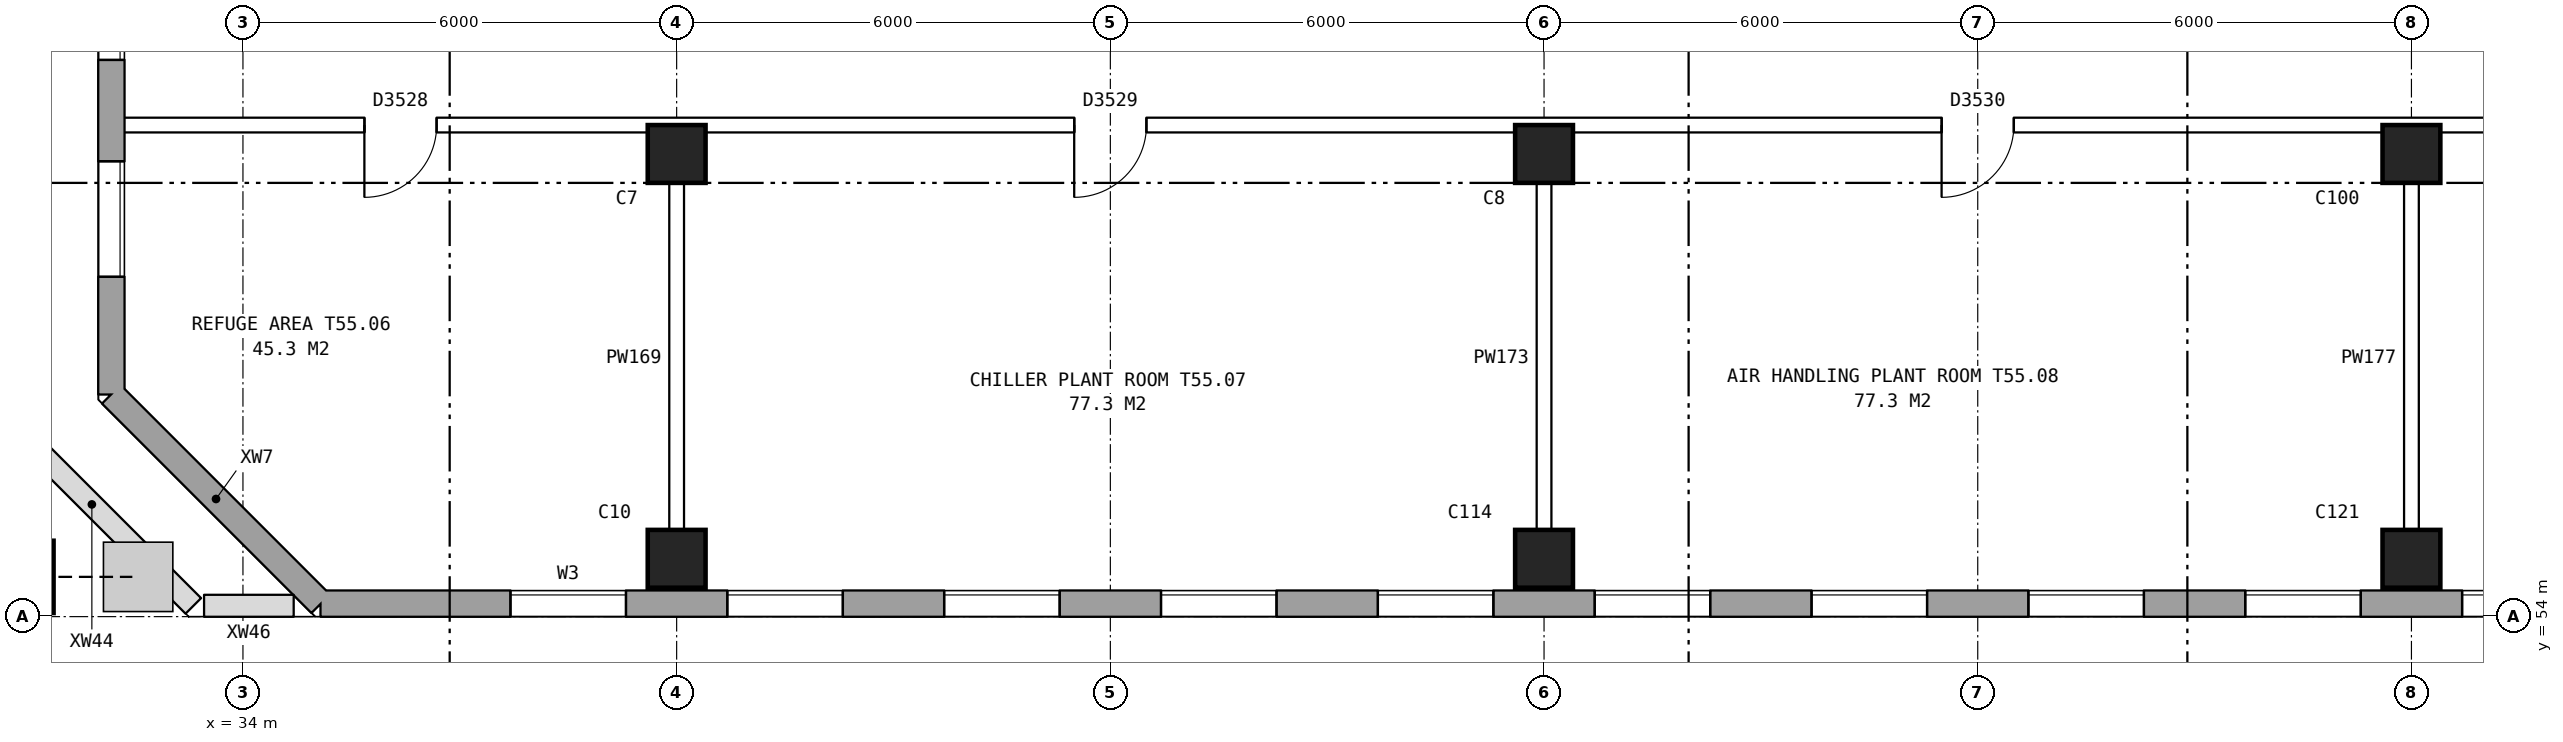
"""IFC4 building model, lengths in metres.
Left out: names, types, materials, properties, quantities, classifications, styles, units other than length and angle.
Written with IfcOpenShell. Run it as: python <this file> out.ifc"""

import sys

from ifc_helpers import new_model, si_unit, direction, frame, frame_2d, origin, origin_2d, place, context, subcontext, project, spatial, rectangle, hollow_rectangle, extrude, element, fill, save


model = new_model("IFC4")
c1 = context("Model", 3, precision=1e-05, world=origin(), true_north=direction((0.0, 1.0)))
c2 = subcontext(c1, "Body", "Model", "MODEL_VIEW")
j1 = project(units=[si_unit("LENGTHUNIT", "METRE"), si_unit("PLANEANGLEUNIT", "RADIAN")], contexts=[c1])
p1 = place(None, origin())
s1 = spatial("IfcSite", under=j1, at=p1, CompositionType="ELEMENT")
p2 = place(p1, origin())
s2 = spatial("IfcBuilding", under=s1, at=p2, CompositionType="ELEMENT")
p3 = place(p2, frame((0.0, 0.0, 194.4)))
s3 = spatial("IfcBuildingStorey", under=s2, at=p3, CompositionType="ELEMENT", Elevation=194.4)
for number, where, z_axis, x_axis in (
    (1, (40.0, 54.8, 0.0), (0.0, 0.0, 1.0), (1.0, 0.0, 0.0)),
    (2, (40.0, 60.4, 0.0), (0.0, 0.0, 1.0), (1.0, 0.0, 0.0)),
    (3, (52.0, 54.8, 0.0), (0.0, 0.0, 1.0), (1.0, 0.0, 0.0)),
    (4, (52.0, 60.4, 0.0), (0.0, 0.0, 1.0), (1.0, 0.0, 0.0)),
    (5, (64.0, 54.8, 0.0), (0.0, 0.0, 1.0), (1.0, 0.0, 0.0)),
    (6, (64.0, 60.4, 0.0), (0.0, 0.0, 1.0), (1.0, 0.0, 0.0)),
):
    element("IfcColumn", number, at=place(p3, frame(where, z_axis=z_axis, x_axis=x_axis)), inside=s3, PredefinedType="COLUMN", context=c2, shape_type="SweptSolid", body=[
        extrude(rectangle(XDim=0.8, YDim=0.8, at=origin_2d()), origin(), (0.0, 0.0, 1.0), 3.95),
    ])
p4 = place(p3, frame((30.88, 54.55, 0.192), z_axis=(0.384632160448, 0.0, 0.923069932968), x_axis=(0.0, 1.0, 0.0)))
e7 = element("IfcColumn", 7, at=p4, inside=s3, PredefinedType="COLUMN", context=c2, shape_type="SweptSolid", body=[
    extrude(hollow_rectangle(XDim=1.0, YDim=1.0, WallThickness=0.055, at=origin_2d()), origin(), (0.0, 0.0, 1.0), 4.133),
])
p5 = place(p3, frame((32.18, 57.075, 0.0), z_axis=(0.0, 0.0, 1.0), x_axis=(0.707106781187, -0.707106781187, 0.0)))
e8 = element("IfcWall", 8, at=p5, inside=s3, PredefinedType="STANDARD", context=c2, shape_type="SweptSolid", body=[
    extrude(rectangle(XDim=4.094, YDim=0.36, at=frame_2d((2.047, 0.0))), origin(), (0.0, 0.0, 1.0), 3.95),
])
p6 = place(p3, frame((35.075, 54.18, 0.0), z_axis=(0.0, 0.0, 1.0), x_axis=(1.0, 0.0, 0.0)))
e9 = element("IfcWall", 9, at=p6, inside=s3, PredefinedType="STANDARD", context=c2, shape_type="SweptSolid", body=[
    extrude(rectangle(XDim=39.875, YDim=0.36, at=frame_2d((19.938, 0.0))), origin(), (0.0, 0.0, 1.0), 3.95),
])
p7 = place(p6, frame((2.625, 0.0, 1.5)))
e10 = element("IfcOpeningElement", 10, at=p7, cuts=e9, PredefinedType="OPENING", context=c2, shape_type="SweptSolid", body=[
    extrude(rectangle(XDim=1.6, YDim=1.2, at=frame_2d((0.8, 0.6))), frame((0.0, 0.19, 0.0), z_axis=(0.0, -1.0, 0.0), x_axis=(1.0, 0.0, 0.0)), (0.0, 0.0, 1.0), 0.38),
])
p8 = place(p6, frame((5.625, 0.0, 1.5)))
e11 = element("IfcOpeningElement", 11, at=p8, cuts=e9, PredefinedType="OPENING", context=c2, shape_type="SweptSolid", body=[
    extrude(rectangle(XDim=1.6, YDim=1.2, at=frame_2d((0.8, 0.6))), frame((0.0, 0.19, 0.0), z_axis=(0.0, -1.0, 0.0), x_axis=(1.0, 0.0, 0.0)), (0.0, 0.0, 1.0), 0.38),
])
p9 = place(p6, frame((8.625, 0.0, 1.5)))
e12 = element("IfcOpeningElement", 12, at=p9, cuts=e9, PredefinedType="OPENING", context=c2, shape_type="SweptSolid", body=[
    extrude(rectangle(XDim=1.6, YDim=1.2, at=frame_2d((0.8, 0.6))), frame((0.0, 0.19, 0.0), z_axis=(0.0, -1.0, 0.0), x_axis=(1.0, 0.0, 0.0)), (0.0, 0.0, 1.0), 0.38),
])
p10 = place(p6, frame((11.625, 0.0, 1.5)))
e13 = element("IfcOpeningElement", 13, at=p10, cuts=e9, PredefinedType="OPENING", context=c2, shape_type="SweptSolid", body=[
    extrude(rectangle(XDim=1.6, YDim=1.2, at=frame_2d((0.8, 0.6))), frame((0.0, 0.19, 0.0), z_axis=(0.0, -1.0, 0.0), x_axis=(1.0, 0.0, 0.0)), (0.0, 0.0, 1.0), 0.38),
])
p11 = place(p6, frame((14.625, 0.0, 1.5)))
e14 = element("IfcOpeningElement", 14, at=p11, cuts=e9, PredefinedType="OPENING", context=c2, shape_type="SweptSolid", body=[
    extrude(rectangle(XDim=1.6, YDim=1.2, at=frame_2d((0.8, 0.6))), frame((0.0, 0.19, 0.0), z_axis=(0.0, -1.0, 0.0), x_axis=(1.0, 0.0, 0.0)), (0.0, 0.0, 1.0), 0.38),
])
p12 = place(p6, frame((17.625, 0.0, 1.5)))
e15 = element("IfcOpeningElement", 15, at=p12, cuts=e9, PredefinedType="OPENING", context=c2, shape_type="SweptSolid", body=[
    extrude(rectangle(XDim=1.6, YDim=1.2, at=frame_2d((0.8, 0.6))), frame((0.0, 0.19, 0.0), z_axis=(0.0, -1.0, 0.0), x_axis=(1.0, 0.0, 0.0)), (0.0, 0.0, 1.0), 0.38),
])
p13 = place(p6, frame((20.625, 0.0, 1.5)))
e16 = element("IfcOpeningElement", 16, at=p13, cuts=e9, PredefinedType="OPENING", context=c2, shape_type="SweptSolid", body=[
    extrude(rectangle(XDim=1.6, YDim=1.2, at=frame_2d((0.8, 0.6))), frame((0.0, 0.19, 0.0), z_axis=(0.0, -1.0, 0.0), x_axis=(1.0, 0.0, 0.0)), (0.0, 0.0, 1.0), 0.38),
])
p14 = place(p6, frame((23.625, 0.0, 1.5)))
e17 = element("IfcOpeningElement", 17, at=p14, cuts=e9, PredefinedType="OPENING", context=c2, shape_type="SweptSolid", body=[
    extrude(rectangle(XDim=1.6, YDim=1.2, at=frame_2d((0.8, 0.6))), frame((0.0, 0.19, 0.0), z_axis=(0.0, -1.0, 0.0), x_axis=(1.0, 0.0, 0.0)), (0.0, 0.0, 1.0), 0.38),
])
p15 = place(p6, frame((26.625, 0.0, 1.5)))
e18 = element("IfcOpeningElement", 18, at=p15, cuts=e9, PredefinedType="OPENING", context=c2, shape_type="SweptSolid", body=[
    extrude(rectangle(XDim=1.6, YDim=1.2, at=frame_2d((0.8, 0.6))), frame((0.0, 0.19, 0.0), z_axis=(0.0, -1.0, 0.0), x_axis=(1.0, 0.0, 0.0)), (0.0, 0.0, 1.0), 0.38),
])
p16 = place(p6, frame((29.625, 0.0, 1.5)))
e19 = element("IfcOpeningElement", 19, at=p16, cuts=e9, PredefinedType="OPENING", context=c2, shape_type="SweptSolid", body=[
    extrude(rectangle(XDim=1.6, YDim=1.2, at=frame_2d((0.8, 0.6))), frame((0.0, 0.19, 0.0), z_axis=(0.0, -1.0, 0.0), x_axis=(1.0, 0.0, 0.0)), (0.0, 0.0, 1.0), 0.38),
])
p17 = place(p6, frame((32.625, 0.0, 1.5)))
e20 = element("IfcOpeningElement", 20, at=p17, cuts=e9, PredefinedType="OPENING", context=c2, shape_type="SweptSolid", body=[
    extrude(rectangle(XDim=1.6, YDim=1.2, at=frame_2d((0.8, 0.6))), frame((0.0, 0.19, 0.0), z_axis=(0.0, -1.0, 0.0), x_axis=(1.0, 0.0, 0.0)), (0.0, 0.0, 1.0), 0.38),
])
p18 = place(p6, frame((35.625, 0.0, 1.5)))
e21 = element("IfcOpeningElement", 21, at=p18, cuts=e9, PredefinedType="OPENING", context=c2, shape_type="SweptSolid", body=[
    extrude(rectangle(XDim=1.6, YDim=1.2, at=frame_2d((0.8, 0.6))), frame((0.0, 0.19, 0.0), z_axis=(0.0, -1.0, 0.0), x_axis=(1.0, 0.0, 0.0)), (0.0, 0.0, 1.0), 0.38),
])
p19 = place(p3, frame((32.18, 82.925, 0.0), z_axis=(0.0, 0.0, 1.0), x_axis=(0.0, -1.0, 0.0)))
e22 = element("IfcWall", 22, at=p19, inside=s3, PredefinedType="STANDARD", context=c2, shape_type="SweptSolid", body=[
    extrude(rectangle(XDim=25.851, YDim=0.36, at=frame_2d((12.925, 0.0))), origin(), (0.0, 0.0, 1.0), 3.95),
])
p20 = place(p19, frame((1.625, 0.0, 1.5)))
e23 = element("IfcOpeningElement", 23, at=p20, cuts=e22, PredefinedType="OPENING", context=c2, shape_type="SweptSolid", body=[
    extrude(rectangle(XDim=1.6, YDim=1.2, at=frame_2d((0.8, 0.6))), frame((0.0, 0.19, 0.0), z_axis=(0.0, -1.0, 0.0), x_axis=(1.0, 0.0, 0.0)), (0.0, 0.0, 1.0), 0.38),
])
p21 = place(p19, frame((4.625, 0.0, 1.5)))
e24 = element("IfcOpeningElement", 24, at=p21, cuts=e22, PredefinedType="OPENING", context=c2, shape_type="SweptSolid", body=[
    extrude(rectangle(XDim=1.6, YDim=1.2, at=frame_2d((0.8, 0.6))), frame((0.0, 0.19, 0.0), z_axis=(0.0, -1.0, 0.0), x_axis=(1.0, 0.0, 0.0)), (0.0, 0.0, 1.0), 0.38),
])
p22 = place(p19, frame((19.625, 0.0, 1.5)))
e25 = element("IfcOpeningElement", 25, at=p22, cuts=e22, PredefinedType="OPENING", context=c2, shape_type="SweptSolid", body=[
    extrude(rectangle(XDim=1.6, YDim=1.2, at=frame_2d((0.8, 0.6))), frame((0.0, 0.19, 0.0), z_axis=(0.0, -1.0, 0.0), x_axis=(1.0, 0.0, 0.0)), (0.0, 0.0, 1.0), 0.38),
])
p23 = place(p19, frame((22.625, 0.0, 1.5)))
e26 = element("IfcOpeningElement", 26, at=p23, cuts=e22, PredefinedType="OPENING", context=c2, shape_type="SweptSolid", body=[
    extrude(rectangle(XDim=1.6, YDim=1.2, at=frame_2d((0.8, 0.6))), frame((0.0, 0.19, 0.0), z_axis=(0.0, -1.0, 0.0), x_axis=(1.0, 0.0, 0.0)), (0.0, 0.0, 1.0), 0.38),
])
p24 = place(p3, frame((30.508, 56.955, 0.0), z_axis=(0.0, 0.0, 1.0), x_axis=(0.70707600329, -0.707137557743, 0.0)))
e27 = element("IfcWall", 27, at=p24, inside=s3, PredefinedType="PARAPET", context=c2, shape_type="SweptSolid", body=[
    extrude(rectangle(XDim=3.966, YDim=0.3, at=frame_2d((1.983, 0.0))), origin(), (0.0, 0.0, 1.0), 1.1),
])
p25 = place(p3, frame((33.464, 54.15, 0.0), z_axis=(0.0, 0.0, 1.0), x_axis=(1.0, 0.0, 0.0)))
e28 = element("IfcWall", 28, at=p25, inside=s3, PredefinedType="PARAPET", context=c2, shape_type="SweptSolid", body=[
    extrude(rectangle(XDim=1.236, YDim=0.3, at=frame_2d((0.618, 0.0))), origin(), (0.0, 0.0, 1.0), 1.1),
])
p26 = place(p3, frame((32.24, 60.8, 0.0), z_axis=(0.0, 0.0, 1.0), x_axis=(1.0, 0.0, 0.0)))
e29 = element("IfcWall", 29, at=p26, inside=s3, PredefinedType="PARTITIONING", context=c2, shape_type="SweptSolid", body=[
    extrude(rectangle(XDim=136.52, YDim=0.2, at=frame_2d((68.26, 0.0))), origin(), (0.0, 0.0, 1.0), 3.95),
])
p27 = place(p26, frame((3.44, 0.0, 0.0)))
e30 = element("IfcOpeningElement", 30, at=p27, cuts=e29, PredefinedType="OPENING", context=c2, shape_type="SweptSolid", body=[
    extrude(rectangle(XDim=1.0, YDim=2.1, at=frame_2d((0.5, 1.05))), frame((0.0, 0.11, 0.0), z_axis=(0.0, -1.0, 0.0), x_axis=(1.0, 0.0, 0.0)), (0.0, 0.0, 1.0), 0.22),
])
p28 = place(p26, frame((13.26, 0.0, 0.0)))
e31 = element("IfcOpeningElement", 31, at=p28, cuts=e29, PredefinedType="OPENING", context=c2, shape_type="SweptSolid", body=[
    extrude(rectangle(XDim=1.0, YDim=2.1, at=frame_2d((0.5, 1.05))), frame((0.0, 0.11, 0.0), z_axis=(0.0, -1.0, 0.0), x_axis=(1.0, 0.0, 0.0)), (0.0, 0.0, 1.0), 0.22),
])
p29 = place(p26, frame((25.26, 0.0, 0.0)))
e32 = element("IfcOpeningElement", 32, at=p29, cuts=e29, PredefinedType="OPENING", context=c2, shape_type="SweptSolid", body=[
    extrude(rectangle(XDim=1.0, YDim=2.1, at=frame_2d((0.5, 1.05))), frame((0.0, 0.11, 0.0), z_axis=(0.0, -1.0, 0.0), x_axis=(1.0, 0.0, 0.0)), (0.0, 0.0, 1.0), 0.22),
])
p30 = place(p26, frame((37.08, 0.0, 0.0)))
e33 = element("IfcOpeningElement", 33, at=p30, cuts=e29, PredefinedType="OPENING", context=c2, shape_type="SweptSolid", body=[
    extrude(rectangle(XDim=1.0, YDim=2.1, at=frame_2d((0.5, 1.05))), frame((0.0, 0.11, 0.0), z_axis=(0.0, -1.0, 0.0), x_axis=(1.0, 0.0, 0.0)), (0.0, 0.0, 1.0), 0.22),
])
p31 = place(p26, frame((49.955, 0.0, 0.0)))
e34 = element("IfcOpeningElement", 34, at=p31, cuts=e29, PredefinedType="OPENING", context=c2, shape_type="SweptSolid", body=[
    extrude(rectangle(XDim=1.0, YDim=2.1, at=frame_2d((0.5, 1.05))), frame((0.0, 0.11, 0.0), z_axis=(0.0, -1.0, 0.0), x_axis=(1.0, 0.0, 0.0)), (0.0, 0.0, 1.0), 0.22),
])
p32 = place(p26, frame((63.885, 0.0, 0.0)))
e35 = element("IfcOpeningElement", 35, at=p32, cuts=e29, PredefinedType="OPENING", context=c2, shape_type="SweptSolid", body=[
    extrude(rectangle(XDim=1.0, YDim=2.1, at=frame_2d((0.5, 1.05))), frame((0.0, 0.11, 0.0), z_axis=(0.0, -1.0, 0.0), x_axis=(1.0, 0.0, 0.0)), (0.0, 0.0, 1.0), 0.22),
])
p33 = place(p26, frame((77.635, 0.0, 0.0)))
e36 = element("IfcOpeningElement", 36, at=p33, cuts=e29, PredefinedType="OPENING", context=c2, shape_type="SweptSolid", body=[
    extrude(rectangle(XDim=1.0, YDim=2.1, at=frame_2d((0.5, 1.05))), frame((0.0, 0.11, 0.0), z_axis=(0.0, -1.0, 0.0), x_axis=(1.0, 0.0, 0.0)), (0.0, 0.0, 1.0), 0.22),
])
p34 = place(p26, frame((91.565, 0.0, 0.0)))
e37 = element("IfcOpeningElement", 37, at=p34, cuts=e29, PredefinedType="OPENING", context=c2, shape_type="SweptSolid", body=[
    extrude(rectangle(XDim=1.0, YDim=2.1, at=frame_2d((0.5, 1.05))), frame((0.0, 0.11, 0.0), z_axis=(0.0, -1.0, 0.0), x_axis=(1.0, 0.0, 0.0)), (0.0, 0.0, 1.0), 0.22),
])
p35 = place(p26, frame((104.44, 0.0, 0.0)))
e38 = element("IfcOpeningElement", 38, at=p35, cuts=e29, PredefinedType="OPENING", context=c2, shape_type="SweptSolid", body=[
    extrude(rectangle(XDim=1.0, YDim=2.1, at=frame_2d((0.5, 1.05))), frame((0.0, 0.11, 0.0), z_axis=(0.0, -1.0, 0.0), x_axis=(1.0, 0.0, 0.0)), (0.0, 0.0, 1.0), 0.22),
])
p36 = place(p26, frame((116.26, 0.0, 0.0)))
e39 = element("IfcOpeningElement", 39, at=p36, cuts=e29, PredefinedType="OPENING", context=c2, shape_type="SweptSolid", body=[
    extrude(rectangle(XDim=1.0, YDim=2.1, at=frame_2d((0.5, 1.05))), frame((0.0, 0.11, 0.0), z_axis=(0.0, -1.0, 0.0), x_axis=(1.0, 0.0, 0.0)), (0.0, 0.0, 1.0), 0.22),
])
p37 = place(p26, frame((129.08, 0.0, 0.0)))
e40 = element("IfcOpeningElement", 40, at=p37, cuts=e29, PredefinedType="OPENING", context=c2, shape_type="SweptSolid", body=[
    extrude(rectangle(XDim=1.0, YDim=2.1, at=frame_2d((0.5, 1.05))), frame((0.0, 0.11, 0.0), z_axis=(0.0, -1.0, 0.0), x_axis=(1.0, 0.0, 0.0)), (0.0, 0.0, 1.0), 0.22),
])
for number, where, z_axis, x_axis in (
    (41, (40.0, 54.24, 0.0), (0.0, 0.0, 1.0), (0.0, 1.0, 0.0)),
    (42, (52.0, 54.24, 0.0), (0.0, 0.0, 1.0), (0.0, 1.0, 0.0)),
    (43, (64.0, 54.24, 0.0), (0.0, 0.0, 1.0), (0.0, 1.0, 0.0)),
):
    element("IfcWall", number, at=place(p3, frame(where, z_axis=z_axis, x_axis=x_axis)), inside=s3, PredefinedType="PARTITIONING", context=c2, shape_type="SweptSolid", body=[
        extrude(rectangle(XDim=6.66, YDim=0.2, at=frame_2d((3.33, 0.0))), origin(), (0.0, 0.0, 1.0), 3.95),
    ])
p38 = place(p7, origin())
e44 = element("IfcWindow", 44, at=p38, inside=s3, PartitioningType="DOUBLE_PANEL_HORIZONTAL", PredefinedType="WINDOW", context=c2, shape_type="SweptSolid", body=[
    extrude(rectangle(XDim=1.6, YDim=1.2, at=frame_2d((0.8, 0.6))), frame((0.0, 0.15, 0.0), z_axis=(0.0, -1.0, 0.0), x_axis=(1.0, 0.0, 0.0)), (0.0, 0.0, 1.0), 0.06),
])
fill(e10, e44)
p39 = place(p8, origin())
e45 = element("IfcWindow", 45, at=p39, inside=s3, PartitioningType="DOUBLE_PANEL_HORIZONTAL", PredefinedType="WINDOW", context=c2, shape_type="SweptSolid", body=[
    extrude(rectangle(XDim=1.6, YDim=1.2, at=frame_2d((0.8, 0.6))), frame((0.0, 0.15, 0.0), z_axis=(0.0, -1.0, 0.0), x_axis=(1.0, 0.0, 0.0)), (0.0, 0.0, 1.0), 0.06),
])
fill(e11, e45)
p40 = place(p9, origin())
e46 = element("IfcWindow", 46, at=p40, inside=s3, PartitioningType="DOUBLE_PANEL_HORIZONTAL", PredefinedType="WINDOW", context=c2, shape_type="SweptSolid", body=[
    extrude(rectangle(XDim=1.6, YDim=1.2, at=frame_2d((0.8, 0.6))), frame((0.0, 0.15, 0.0), z_axis=(0.0, -1.0, 0.0), x_axis=(1.0, 0.0, 0.0)), (0.0, 0.0, 1.0), 0.06),
])
fill(e12, e46)
p41 = place(p10, origin())
e47 = element("IfcWindow", 47, at=p41, inside=s3, PartitioningType="DOUBLE_PANEL_HORIZONTAL", PredefinedType="WINDOW", context=c2, shape_type="SweptSolid", body=[
    extrude(rectangle(XDim=1.6, YDim=1.2, at=frame_2d((0.8, 0.6))), frame((0.0, 0.15, 0.0), z_axis=(0.0, -1.0, 0.0), x_axis=(1.0, 0.0, 0.0)), (0.0, 0.0, 1.0), 0.06),
])
fill(e13, e47)
p42 = place(p11, origin())
e48 = element("IfcWindow", 48, at=p42, inside=s3, PartitioningType="DOUBLE_PANEL_HORIZONTAL", PredefinedType="WINDOW", context=c2, shape_type="SweptSolid", body=[
    extrude(rectangle(XDim=1.6, YDim=1.2, at=frame_2d((0.8, 0.6))), frame((0.0, 0.15, 0.0), z_axis=(0.0, -1.0, 0.0), x_axis=(1.0, 0.0, 0.0)), (0.0, 0.0, 1.0), 0.06),
])
fill(e14, e48)
p43 = place(p12, origin())
e49 = element("IfcWindow", 49, at=p43, inside=s3, PartitioningType="DOUBLE_PANEL_HORIZONTAL", PredefinedType="WINDOW", context=c2, shape_type="SweptSolid", body=[
    extrude(rectangle(XDim=1.6, YDim=1.2, at=frame_2d((0.8, 0.6))), frame((0.0, 0.15, 0.0), z_axis=(0.0, -1.0, 0.0), x_axis=(1.0, 0.0, 0.0)), (0.0, 0.0, 1.0), 0.06),
])
fill(e15, e49)
p44 = place(p13, origin())
e50 = element("IfcWindow", 50, at=p44, inside=s3, PartitioningType="DOUBLE_PANEL_HORIZONTAL", PredefinedType="WINDOW", context=c2, shape_type="SweptSolid", body=[
    extrude(rectangle(XDim=1.6, YDim=1.2, at=frame_2d((0.8, 0.6))), frame((0.0, 0.15, 0.0), z_axis=(0.0, -1.0, 0.0), x_axis=(1.0, 0.0, 0.0)), (0.0, 0.0, 1.0), 0.06),
])
fill(e16, e50)
p45 = place(p14, origin())
e51 = element("IfcWindow", 51, at=p45, inside=s3, PartitioningType="DOUBLE_PANEL_HORIZONTAL", PredefinedType="WINDOW", context=c2, shape_type="SweptSolid", body=[
    extrude(rectangle(XDim=1.6, YDim=1.2, at=frame_2d((0.8, 0.6))), frame((0.0, 0.15, 0.0), z_axis=(0.0, -1.0, 0.0), x_axis=(1.0, 0.0, 0.0)), (0.0, 0.0, 1.0), 0.06),
])
fill(e17, e51)
p46 = place(p15, origin())
e52 = element("IfcWindow", 52, at=p46, inside=s3, PartitioningType="DOUBLE_PANEL_HORIZONTAL", PredefinedType="WINDOW", context=c2, shape_type="SweptSolid", body=[
    extrude(rectangle(XDim=1.6, YDim=1.2, at=frame_2d((0.8, 0.6))), frame((0.0, 0.15, 0.0), z_axis=(0.0, -1.0, 0.0), x_axis=(1.0, 0.0, 0.0)), (0.0, 0.0, 1.0), 0.06),
])
fill(e18, e52)
p47 = place(p16, origin())
e53 = element("IfcWindow", 53, at=p47, inside=s3, PartitioningType="DOUBLE_PANEL_HORIZONTAL", PredefinedType="WINDOW", context=c2, shape_type="SweptSolid", body=[
    extrude(rectangle(XDim=1.6, YDim=1.2, at=frame_2d((0.8, 0.6))), frame((0.0, 0.15, 0.0), z_axis=(0.0, -1.0, 0.0), x_axis=(1.0, 0.0, 0.0)), (0.0, 0.0, 1.0), 0.06),
])
fill(e19, e53)
p48 = place(p22, origin())
e54 = element("IfcWindow", 54, at=p48, inside=s3, PartitioningType="DOUBLE_PANEL_HORIZONTAL", PredefinedType="WINDOW", context=c2, shape_type="SweptSolid", body=[
    extrude(rectangle(XDim=1.6, YDim=1.2, at=frame_2d((0.8, 0.6))), frame((0.0, 0.15, 0.0), z_axis=(0.0, -1.0, 0.0), x_axis=(1.0, 0.0, 0.0)), (0.0, 0.0, 1.0), 0.06),
])
fill(e25, e54)
p49 = place(p23, origin())
e55 = element("IfcWindow", 55, at=p49, inside=s3, PartitioningType="DOUBLE_PANEL_HORIZONTAL", PredefinedType="WINDOW", context=c2, shape_type="SweptSolid", body=[
    extrude(rectangle(XDim=1.6, YDim=1.2, at=frame_2d((0.8, 0.6))), frame((0.0, 0.15, 0.0), z_axis=(0.0, -1.0, 0.0), x_axis=(1.0, 0.0, 0.0)), (0.0, 0.0, 1.0), 0.06),
])
fill(e26, e55)
p50 = place(p27, frame((1.0, 0.0, 0.0), z_axis=(0.0, 0.0, 1.0), x_axis=(-1.0, 0.0, 0.0)))
e56 = element("IfcDoor", 56, at=p50, inside=s3, OperationType="SINGLE_SWING_RIGHT", PredefinedType="DOOR", context=c2, shape_type="SweptSolid", body=[
    extrude(rectangle(XDim=1.0, YDim=2.1, at=frame_2d((0.5, 1.05))), frame((0.0, 0.025, 0.0), z_axis=(0.0, -1.0, 0.0), x_axis=(1.0, 0.0, 0.0)), (0.0, 0.0, 1.0), 0.05),
])
fill(e30, e56)
p51 = place(p28, frame((1.0, 0.0, 0.0), z_axis=(0.0, 0.0, 1.0), x_axis=(-1.0, 0.0, 0.0)))
e57 = element("IfcDoor", 57, at=p51, inside=s3, OperationType="SINGLE_SWING_RIGHT", PredefinedType="DOOR", context=c2, shape_type="SweptSolid", body=[
    extrude(rectangle(XDim=1.0, YDim=2.1, at=frame_2d((0.5, 1.05))), frame((0.0, 0.025, 0.0), z_axis=(0.0, -1.0, 0.0), x_axis=(1.0, 0.0, 0.0)), (0.0, 0.0, 1.0), 0.05),
])
fill(e31, e57)
p52 = place(p29, frame((1.0, 0.0, 0.0), z_axis=(0.0, 0.0, 1.0), x_axis=(-1.0, 0.0, 0.0)))
e58 = element("IfcDoor", 58, at=p52, inside=s3, OperationType="SINGLE_SWING_RIGHT", PredefinedType="DOOR", context=c2, shape_type="SweptSolid", body=[
    extrude(rectangle(XDim=1.0, YDim=2.1, at=frame_2d((0.5, 1.05))), frame((0.0, 0.025, 0.0), z_axis=(0.0, -1.0, 0.0), x_axis=(1.0, 0.0, 0.0)), (0.0, 0.0, 1.0), 0.05),
])
fill(e32, e58)
save(model, sys.argv[1])
